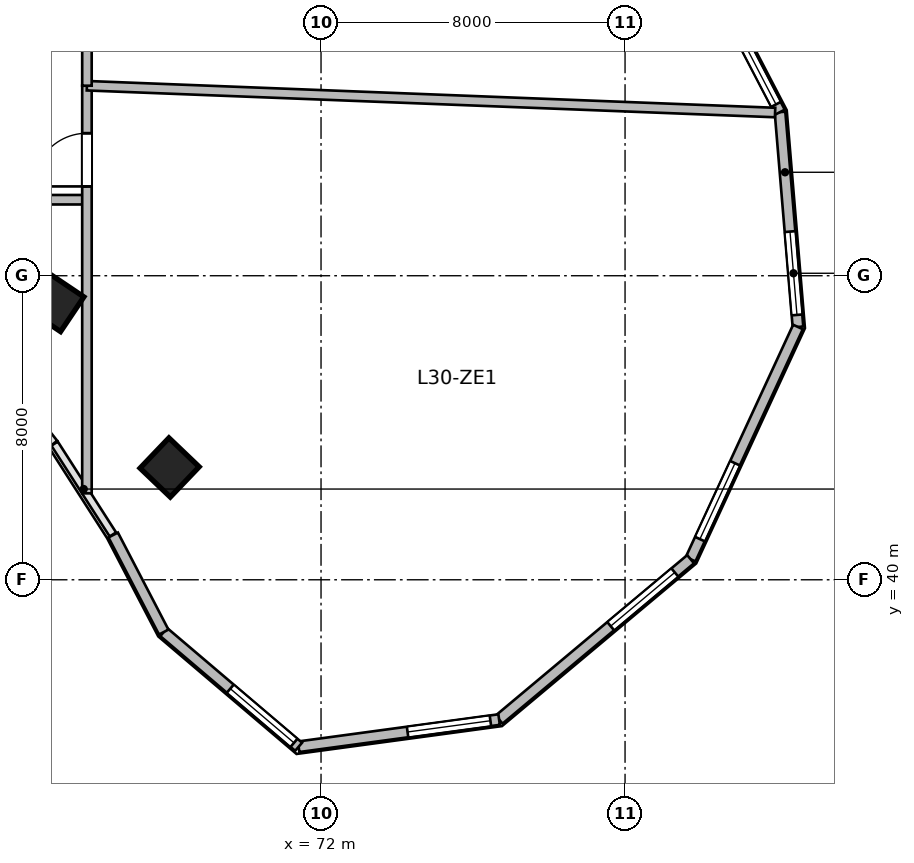
"""IFC4 building model, lengths in metres.
Left out: names, types, materials, properties, quantities, classifications, styles, units other than length and angle.
Written with IfcOpenShell. Run it as: python <this file> out.ifc"""

import sys

from ifc_helpers import new_model, si_unit, direction, frame, frame_2d, origin, origin_2d, place, context, subcontext, project, spatial, rectangle, extrude, source, transform, mapped, element, fill, save


model = new_model("IFC4")
c1 = context("Model", 3, precision=1e-05, world=origin(), true_north=direction((0.0, 1.0)))
c2 = subcontext(c1, "Body", "Model", "MODEL_VIEW")
j1 = project(units=[si_unit("LENGTHUNIT", "METRE"), si_unit("PLANEANGLEUNIT", "RADIAN")], contexts=[c1])
p1 = place(None, origin())
s1 = spatial("IfcSite", under=j1, at=p1, CompositionType="ELEMENT")
p2 = place(p1, origin())
s2 = spatial("IfcBuilding", under=s1, at=p2, CompositionType="ELEMENT")
p3 = place(p2, frame((0.0, 0.0, 127.2)))
s3 = spatial("IfcBuildingStorey", under=s2, at=p3, CompositionType="ELEMENT", Elevation=127.2)
m1 = source(origin(), c2, "Body", "SweptSolid", [
    extrude(rectangle(XDim=1.1, YDim=1.1, at=origin_2d()), origin(), (0.0, 0.0, 1.0), 3.9),
])
for number, where, z_axis, x_axis in (
    (1, (64.996, 47.294, 0.0), (0.0, 0.0, 1.0), (0.558, 0.83, 0.0)),
    (2, (68.015, 42.955, 0.0), (0.0, 0.0, 1.0), (0.691, 0.723, 0.0)),
):
    element("IfcColumn", number, at=place(p3, frame(where, z_axis=z_axis, x_axis=x_axis)), inside=s3, PredefinedType="COLUMN", context=c2, shape_type="MappedRepresentation", body=[
        mapped(m1, transform((0.0, 0.0, 0.0), scale=1.0)),
    ])
m2 = source(origin(), c2, "Body", "SweptSolid", [
    extrude(rectangle(XDim=5.674, YDim=0.28, at=frame_2d((2.837, 0.0))), origin(), (0.0, 0.0, 1.0), 3.65),
])
p4 = place(p3, frame((84.078, 52.305, 0.0), z_axis=(0.0, 0.0, 1.0), x_axis=(0.083309007867, -0.996523762491, 0.0)))
e3 = element("IfcWall", 3, at=p4, inside=s3, PredefinedType="SOLIDWALL", context=c2, shape_type="MappedRepresentation", body=[
    mapped(m2, transform((0.0, 0.0, 0.0), scale=1.0)),
])
p5 = place(p4, frame((3.155, 0.0, 0.95)))
e4 = element("IfcOpeningElement", 4, at=p5, cuts=e3, PredefinedType="OPENING", context=c2, shape_type="SweptSolid", body=[
    extrude(rectangle(XDim=2.2, YDim=2.1, at=frame_2d((1.1, 1.05))), frame((0.0, 0.15, 0.0), z_axis=(0.0, -1.0, 0.0), x_axis=(1.0, 0.0, 0.0)), (0.0, 0.0, 1.0), 0.3),
])
m3 = source(origin(), c2, "Body", "SweptSolid", [
    extrude(rectangle(XDim=6.732, YDim=0.28, at=frame_2d((3.366, 0.0))), origin(), (0.0, 0.0, 1.0), 3.65),
])
p6 = place(p3, frame((84.55, 46.652, 0.0), z_axis=(0.0, 0.0, 1.0), x_axis=(-0.419644552709, -0.907688520023, 0.0)))
e5 = element("IfcWall", 5, at=p6, inside=s3, PredefinedType="SOLIDWALL", context=c2, shape_type="MappedRepresentation", body=[
    mapped(m3, transform((0.0, 0.0, 0.0), scale=1.0)),
])
p7 = place(p6, frame((3.949, 0.0, 0.95)))
e6 = element("IfcOpeningElement", 6, at=p7, cuts=e5, PredefinedType="OPENING", context=c2, shape_type="SweptSolid", body=[
    extrude(rectangle(XDim=2.2, YDim=2.1, at=frame_2d((1.1, 1.05))), frame((0.0, 0.15, 0.0), z_axis=(0.0, -1.0, 0.0), x_axis=(1.0, 0.0, 0.0)), (0.0, 0.0, 1.0), 0.3),
])
m4 = source(origin(), c2, "Body", "SweptSolid", [
    extrude(rectangle(XDim=6.573, YDim=0.28, at=frame_2d((3.287, 0.0))), origin(), (0.0, 0.0, 1.0), 3.65),
])
p8 = place(p3, frame((81.725, 40.541, 0.0), z_axis=(0.0, 0.0, 1.0), x_axis=(-0.766715154163, -0.641987439423, 0.0)))
e7 = element("IfcWall", 7, at=p8, inside=s3, PredefinedType="SOLIDWALL", context=c2, shape_type="MappedRepresentation", body=[
    mapped(m4, transform((0.0, 0.0, 0.0), scale=1.0)),
])
p9 = place(p8, frame((0.543, 0.0, 0.95)))
e8 = element("IfcOpeningElement", 8, at=p9, cuts=e7, PredefinedType="OPENING", context=c2, shape_type="SweptSolid", body=[
    extrude(rectangle(XDim=2.2, YDim=2.1, at=frame_2d((1.1, 1.05))), frame((0.0, 0.15, 0.0), z_axis=(0.0, -1.0, 0.0), x_axis=(1.0, 0.0, 0.0)), (0.0, 0.0, 1.0), 0.3),
])
m5 = source(origin(), c2, "Body", "SweptSolid", [
    extrude(rectangle(XDim=5.324, YDim=0.28, at=frame_2d((2.662, 0.0))), origin(), (0.0, 0.0, 1.0), 3.65),
])
p10 = place(p3, frame((76.686, 36.322, 0.0), z_axis=(0.0, 0.0, 1.0), x_axis=(-0.990931467223, -0.134368252451, 0.0)))
e9 = element("IfcWall", 9, at=p10, inside=s3, PredefinedType="SOLIDWALL", context=c2, shape_type="MappedRepresentation", body=[
    mapped(m5, transform((0.0, 0.0, 0.0), scale=1.0)),
])
p11 = place(p10, frame((0.231, 0.0, 0.95)))
e10 = element("IfcOpeningElement", 10, at=p11, cuts=e9, PredefinedType="OPENING", context=c2, shape_type="SweptSolid", body=[
    extrude(rectangle(XDim=2.2, YDim=2.1, at=frame_2d((1.1, 1.05))), frame((0.0, 0.15, 0.0), z_axis=(0.0, -1.0, 0.0), x_axis=(1.0, 0.0, 0.0)), (0.0, 0.0, 1.0), 0.3),
])
m6 = source(origin(), c2, "Body", "SweptSolid", [
    extrude(rectangle(XDim=4.659, YDim=0.28, at=frame_2d((2.33, 0.0))), origin(), (0.0, 0.0, 1.0), 3.65),
])
p12 = place(p3, frame((71.41, 35.606, 0.0), z_axis=(0.0, 0.0, 1.0), x_axis=(-0.761913458795, 0.647678841176, 0.0)))
e11 = element("IfcWall", 11, at=p12, inside=s3, PredefinedType="SOLIDWALL", context=c2, shape_type="MappedRepresentation", body=[
    mapped(m6, transform((0.0, 0.0, 0.0), scale=1.0)),
])
p13 = place(p12, frame((0.16, 0.0, 0.95)))
e12 = element("IfcOpeningElement", 12, at=p13, cuts=e11, PredefinedType="OPENING", context=c2, shape_type="SweptSolid", body=[
    extrude(rectangle(XDim=2.2, YDim=2.1, at=frame_2d((1.1, 1.05))), frame((0.0, 0.15, 0.0), z_axis=(0.0, -1.0, 0.0), x_axis=(1.0, 0.0, 0.0)), (0.0, 0.0, 1.0), 0.3),
])
m7 = source(origin(), c2, "Body", "SweptSolid", [
    extrude(rectangle(XDim=2.88, YDim=0.28, at=frame_2d((1.44, 0.0))), origin(), (0.0, 0.0, 1.0), 3.65),
])
p14 = place(p3, frame((67.861, 38.624, 0.0), z_axis=(0.0, 0.0, 1.0), x_axis=(-0.461769086658, 0.887000175088, 0.0)))
e13 = element("IfcWall", 13, at=p14, inside=s3, PredefinedType="SOLIDWALL", context=c2, shape_type="MappedRepresentation", body=[
    mapped(m7, transform((0.0, 0.0, 0.0), scale=1.0)),
])
m8 = source(origin(), c2, "Body", "SweptSolid", [
    extrude(rectangle(XDim=5.315, YDim=0.28, at=frame_2d((2.658, 0.0))), origin(), (0.0, 0.0, 1.0), 3.65),
])
p15 = place(p3, frame((81.623, 57.02, 0.0), z_axis=(0.0, 0.0, 1.0), x_axis=(0.461760527822, -0.887004630735, 0.0)))
e14 = element("IfcWall", 14, at=p15, inside=s3, PredefinedType="SOLIDWALL", context=c2, shape_type="MappedRepresentation", body=[
    mapped(m8, transform((0.0, 0.0, 0.0), scale=1.0)),
])
p16 = place(p15, frame((2.886, 0.0, 0.95)))
e15 = element("IfcOpeningElement", 15, at=p16, cuts=e14, PredefinedType="OPENING", context=c2, shape_type="SweptSolid", body=[
    extrude(rectangle(XDim=2.2, YDim=2.1, at=frame_2d((1.1, 1.05))), frame((0.0, 0.15, 0.0), z_axis=(0.0, -1.0, 0.0), x_axis=(1.0, 0.0, 0.0)), (0.0, 0.0, 1.0), 0.3),
])
m9 = source(origin(), c2, "Body", "SweptSolid", [
    extrude(rectangle(XDim=2.5, YDim=0.25, at=frame_2d((1.25, 0.0))), origin(), (0.0, 0.0, 1.0), 3.65),
])
p17 = place(p3, frame((63.3, 50.0, 0.0), z_axis=(0.0, 0.0, 1.0), x_axis=(1.0, 0.0, 0.0)))
e16 = element("IfcWall", 16, at=p17, inside=s3, PredefinedType="PARTITIONING", context=c2, shape_type="MappedRepresentation", body=[
    mapped(m9, transform((0.0, 0.0, 0.0), scale=1.0)),
])
m10 = source(origin(), c2, "Body", "SweptSolid", [
    extrude(rectangle(XDim=10.726, YDim=0.25, at=frame_2d((5.363, 0.0))), origin(), (0.0, 0.0, 1.0), 2.942),
])
p18 = place(p3, frame((65.84, 42.274, 0.0), z_axis=(0.0, 0.0, 1.0), x_axis=(0.0, 1.0, 0.0)))
e17 = element("IfcWall", 17, at=p18, inside=s3, PredefinedType="PARTITIONING", context=c2, shape_type="MappedRepresentation", body=[
    mapped(m10, transform((0.0, 0.0, 0.0), scale=1.0)),
])
p19 = place(p18, frame((8.076, 0.0, 0.0)))
e18 = element("IfcOpeningElement", 18, at=p19, cuts=e17, PredefinedType="OPENING", context=c2, shape_type="SweptSolid", body=[
    extrude(rectangle(XDim=1.4, YDim=2.15, at=frame_2d((0.7, 1.075))), frame((0.0, 0.135, 0.0), z_axis=(0.0, -1.0, 0.0), x_axis=(1.0, 0.0, 0.0)), (0.0, 0.0, 1.0), 0.27),
])
m11 = source(origin(), c2, "Body", "SweptSolid", [
    extrude(rectangle(XDim=18.122, YDim=0.25, at=frame_2d((9.061, 0.0))), origin(), (0.0, 0.0, 1.0), 3.65),
])
p20 = place(p3, frame((65.84, 53.0, 0.0), z_axis=(0.0, 0.0, 1.0), x_axis=(0.999241241773, -0.038947923447, 0.0)))
e19 = element("IfcWall", 19, at=p20, inside=s3, PredefinedType="PARTITIONING", context=c2, shape_type="MappedRepresentation", body=[
    mapped(m11, transform((0.0, 0.0, 0.0), scale=1.0)),
])
m12 = source(origin(), c2, "Body", "SweptSolid", [
    extrude(rectangle(XDim=7.0, YDim=0.25, at=frame_2d((3.5, 0.0))), origin(), (0.0, 0.0, 1.0), 3.093),
])
p21 = place(p3, frame((65.84, 53.0, 0.0), z_axis=(0.0, 0.0, 1.0), x_axis=(0.0, 1.0, 0.0)))
e20 = element("IfcWall", 20, at=p21, inside=s3, PredefinedType="PARTITIONING", context=c2, shape_type="MappedRepresentation", body=[
    mapped(m12, transform((0.0, 0.0, 0.0), scale=1.0)),
])
p22 = place(p21, frame((2.8, 0.0, 0.0)))
e21 = element("IfcOpeningElement", 21, at=p22, cuts=e20, PredefinedType="OPENING", context=c2, shape_type="SweptSolid", body=[
    extrude(rectangle(XDim=1.4, YDim=2.15, at=frame_2d((0.7, 1.075))), frame((0.0, 0.135, 0.0), z_axis=(0.0, -1.0, 0.0), x_axis=(1.0, 0.0, 0.0)), (0.0, 0.0, 1.0), 0.27),
])
m13 = source(origin(), c2, "Body", "SweptSolid", [
    extrude(rectangle(XDim=2.2, YDim=2.1, at=frame_2d((1.1, 1.05))), frame((0.0, 0.03, 0.0), z_axis=(0.0, -1.0, 0.0), x_axis=(1.0, 0.0, 0.0)), (0.0, 0.0, 1.0), 0.06),
])
p23 = place(p5, origin())
e22 = element("IfcWindow", 22, at=p23, inside=s3, PartitioningType="TRIPLE_PANEL_VERTICAL", PredefinedType="WINDOW", context=c2, shape_type="MappedRepresentation", body=[
    mapped(m13, transform((0.0, 0.0, 0.0), scale=1.0)),
])
fill(e4, e22)
p24 = place(p7, origin())
e23 = element("IfcWindow", 23, at=p24, inside=s3, PartitioningType="TRIPLE_PANEL_VERTICAL", PredefinedType="WINDOW", context=c2, shape_type="MappedRepresentation", body=[
    mapped(m13, transform((0.0, 0.0, 0.0), scale=1.0)),
])
fill(e6, e23)
p25 = place(p9, origin())
e24 = element("IfcWindow", 24, at=p25, inside=s3, PartitioningType="TRIPLE_PANEL_VERTICAL", PredefinedType="WINDOW", context=c2, shape_type="MappedRepresentation", body=[
    mapped(m13, transform((0.0, 0.0, 0.0), scale=1.0)),
])
fill(e8, e24)
p26 = place(p11, origin())
e25 = element("IfcWindow", 25, at=p26, inside=s3, PartitioningType="TRIPLE_PANEL_VERTICAL", PredefinedType="WINDOW", context=c2, shape_type="MappedRepresentation", body=[
    mapped(m13, transform((0.0, 0.0, 0.0), scale=1.0)),
])
fill(e10, e25)
p27 = place(p13, origin())
e26 = element("IfcWindow", 26, at=p27, inside=s3, PartitioningType="TRIPLE_PANEL_VERTICAL", PredefinedType="WINDOW", context=c2, shape_type="MappedRepresentation", body=[
    mapped(m13, transform((0.0, 0.0, 0.0), scale=1.0)),
])
fill(e12, e26)
p28 = place(p16, origin())
e27 = element("IfcWindow", 27, at=p28, inside=s3, PartitioningType="TRIPLE_PANEL_VERTICAL", PredefinedType="WINDOW", context=c2, shape_type="MappedRepresentation", body=[
    mapped(m13, transform((0.0, 0.0, 0.0), scale=1.0)),
])
fill(e15, e27)
m14 = source(origin(), c2, "Body", "SweptSolid", [
    extrude(rectangle(XDim=1.4, YDim=2.15, at=frame_2d((0.7, 1.075))), frame((0.0, 0.025, 0.0), z_axis=(0.0, -1.0, 0.0), x_axis=(1.0, 0.0, 0.0)), (0.0, 0.0, 1.0), 0.05),
])
p29 = place(p19, origin())
e28 = element("IfcDoor", 28, at=p29, inside=s3, OperationType="SINGLE_SWING_LEFT", PredefinedType="DOOR", context=c2, shape_type="MappedRepresentation", body=[
    mapped(m14, transform((0.0, 0.0, 0.0), scale=1.0)),
])
fill(e18, e28)
save(model, sys.argv[1])
